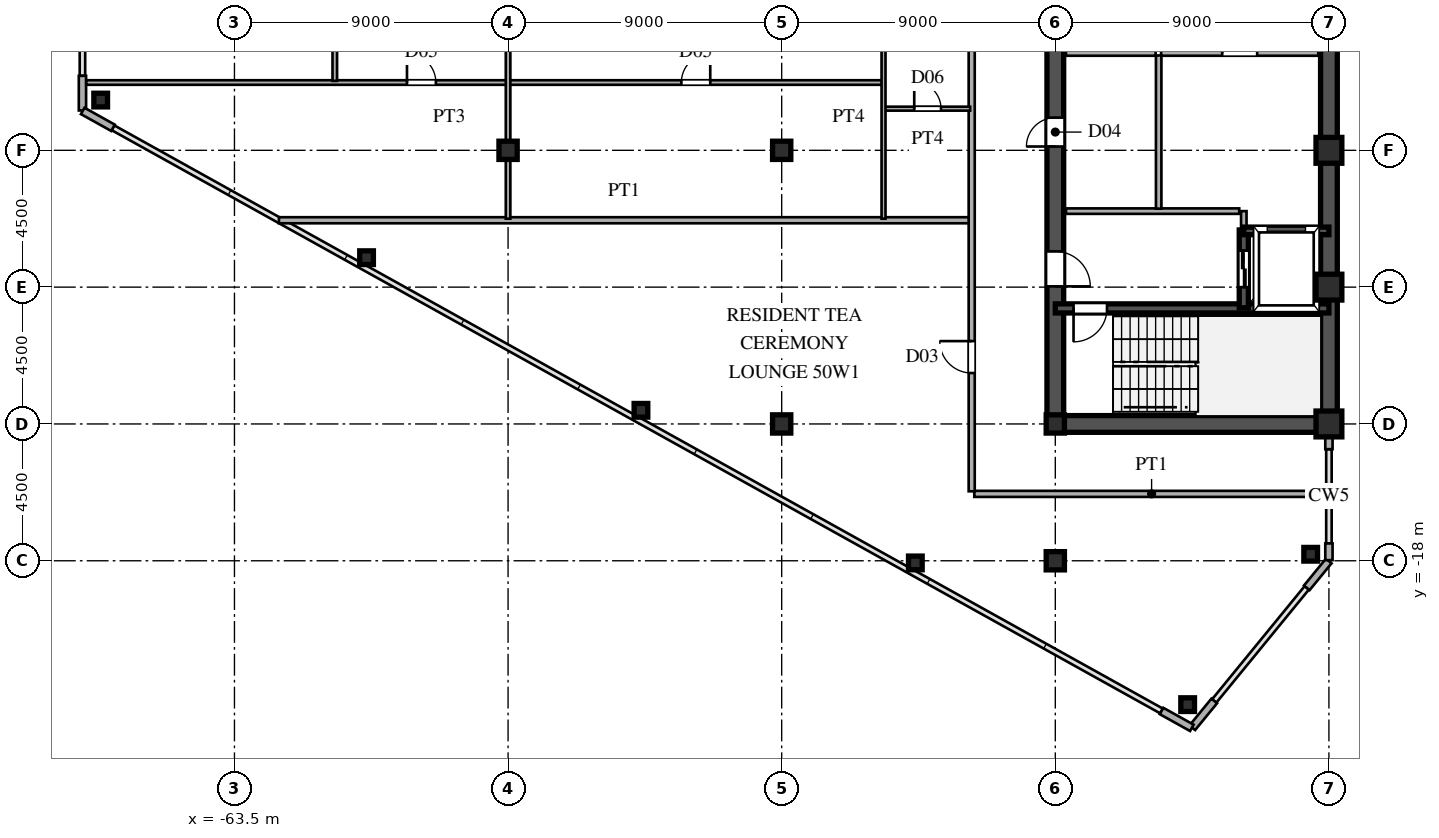
"""IFC4 building model, lengths in metres.
Left out: names, types, materials, properties, quantities, classifications, styles, units other than length and angle.
Written with IfcOpenShell. Run it as: python <this file> out.ifc"""

import sys

from ifc_helpers import new_model, si_unit, direction, frame, frame_2d, origin, origin_2d, place, context, subcontext, project, spatial, rectangle, hollow_rectangle, i_section, extrude, source, transform, mapped, element, fill, save


model = new_model("IFC4")
c1 = context("Model", 3, precision=1e-05, world=origin(), true_north=direction((0.0, 1.0)))
c2 = subcontext(c1, "Body", "Model", "MODEL_VIEW")
j1 = project(units=[si_unit("LENGTHUNIT", "METRE"), si_unit("PLANEANGLEUNIT", "RADIAN")], contexts=[c1])
p1 = place(None, origin())
s1 = spatial("IfcSite", under=j1, at=p1, CompositionType="ELEMENT")
p2 = place(p1, origin())
s2 = spatial("IfcBuilding", under=s1, at=p2, CompositionType="ELEMENT")
p3 = place(p2, frame((0.0, 0.0, 188.7)))
s3 = spatial("IfcBuildingStorey", under=s2, at=p3, CompositionType="ELEMENT", Elevation=188.7)
m1 = source(origin(), c2, "Body", "SweptSolid", [
    extrude(hollow_rectangle(XDim=0.85, YDim=0.85, WallThickness=0.036, at=origin_2d()), origin(), (0.0, 0.0, 1.0), 3.6),
])
for number, where, z_axis, x_axis in (
    (1, (-27.5, -13.5, 0.0), (0.0, 0.0, 1.0), (1.0, 0.0, 0.0)),
    (2, (-27.5, -9.0, 0.0), (0.0, 0.0, 1.0), (1.0, 0.0, 0.0)),
    (3, (-27.5, -4.5, 0.0), (0.0, 0.0, 1.0), (1.0, 0.0, 0.0)),
):
    element("IfcColumn", number, at=place(p3, frame(where, z_axis=z_axis, x_axis=x_axis)), inside=s3, PredefinedType="COLUMN", context=c2, shape_type="MappedRepresentation", body=[
        mapped(m1, transform((0.0, 0.0, 0.0), scale=1.0)),
    ])
m2 = source(origin(), c2, "Body", "SweptSolid", [
    extrude(i_section(OverallWidth=0.6, OverallDepth=0.6, WebThickness=0.025, FlangeThickness=0.04, at=origin_2d()), origin(), (0.0, 0.0, 1.0), 3.6),
])
for number, where, z_axis, x_axis in (
    (4, (-36.5, -18.0, 0.0), (0.0, 0.0, 1.0), (1.0, 0.0, 0.0)),
    (5, (-36.5, -13.5, 0.0), (0.0, 0.0, 1.0), (1.0, 0.0, 0.0)),
    (6, (-45.5, -13.5, 0.0), (0.0, 0.0, 1.0), (1.0, 0.0, 0.0)),
    (7, (-45.5, -4.5, 0.0), (0.0, 0.0, 1.0), (1.0, 0.0, 0.0)),
    (8, (-54.5, -4.5, 0.0), (0.0, 0.0, 1.0), (1.0, 0.0, 0.0)),
):
    element("IfcColumn", number, at=place(p3, frame(where, z_axis=z_axis, x_axis=x_axis)), inside=s3, PredefinedType="COLUMN", context=c2, shape_type="MappedRepresentation", body=[
        mapped(m2, transform((0.0, 0.0, 0.0), scale=1.0)),
    ])
m3 = source(origin(), c2, "Body", "SweptSolid", [
    extrude(hollow_rectangle(XDim=0.45, YDim=0.45, WallThickness=0.018, at=origin_2d()), origin(), (0.0, 0.0, 1.0), 3.6),
])
for number, where, z_axis, x_axis in (
    (9, (-28.1, -17.786, 0.0), (0.0, 0.0, 1.0), (1.0, 0.0, 0.0)),
    (10, (-67.9, -2.847, 0.0), (0.0, 0.0, 1.0), (1.0, 0.0, 0.0)),
    (11, (-32.147, -22.732, 0.0), (0.0, 0.0, 1.0), (1.0, 0.0, 0.0)),
    (12, (-41.104, -18.071, 0.0), (0.0, 0.0, 1.0), (1.0, 0.0, 0.0)),
    (13, (-50.129, -13.051, 0.0), (0.0, 0.0, 1.0), (1.0, 0.0, 0.0)),
    (14, (-59.155, -8.031, 0.0), (0.0, 0.0, 1.0), (1.0, 0.0, 0.0)),
):
    element("IfcColumn", number, at=place(p3, frame(where, z_axis=z_axis, x_axis=x_axis)), inside=s3, PredefinedType="COLUMN", context=c2, shape_type="MappedRepresentation", body=[
        mapped(m3, transform((0.0, 0.0, 0.0), scale=1.0)),
    ])
p4 = place(p3, frame((-27.5, -17.98, 0.0), z_axis=(0.0, 0.0, 1.0), x_axis=(0.0, 1.0, 0.0)))
e15 = element("IfcWall", 15, at=p4, inside=s3, PredefinedType="SOLIDWALL", context=c2, shape_type="SweptSolid", body=[
    extrude(rectangle(XDim=0.55, YDim=0.24, at=frame_2d((0.275, 0.0))), origin(), (0.0, 0.0, 1.0), 3.38),
])
p5 = place(p3, frame((-27.5, -14.33, 0.0), z_axis=(0.0, 0.0, 1.0), x_axis=(0.0, 1.0, 0.0)))
e16 = element("IfcWall", 16, at=p5, inside=s3, PredefinedType="SOLIDWALL", context=c2, shape_type="SweptSolid", body=[
    extrude(rectangle(XDim=0.55, YDim=0.24, at=frame_2d((0.275, 0.0))), origin(), (0.0, 0.0, 1.0), 2.88),
])
for number, where, z_axis, x_axis in (
    (17, (-68.5, -2.05, 0.0), (0.0, 0.0, 1.0), (0.0, -1.0, 0.0)),
    (18, (-68.491, -3.205, 0.0), (0.0, 0.0, 1.0), (0.874, -0.486, 0.0)),
    (19, (-33.005, -22.941, 0.0), (0.0, 0.0, 1.0), (0.874, -0.486, 0.0)),
):
    element("IfcWall", number, at=place(p3, frame(where, z_axis=z_axis, x_axis=x_axis)), inside=s3, PredefinedType="SOLIDWALL", context=c2, shape_type="SweptSolid", body=[
        extrude(rectangle(XDim=1.14, YDim=0.24, at=frame_2d((0.57, 0.0))), origin(), (0.0, 0.0, 1.0), 3.38),
    ])
for number, where, z_axis, x_axis in (
    (20, (-31.994, -23.492, 0.0), (0.0, 0.0, 1.0), (0.633, 0.774, 0.0)),
    (21, (-28.228, -18.89, 0.0), (0.0, 0.0, 1.0), (0.633, 0.774, 0.0)),
):
    element("IfcWall", number, at=place(p3, frame(where, z_axis=z_axis, x_axis=x_axis)), inside=s3, PredefinedType="SOLIDWALL", context=c2, shape_type="SweptSolid", body=[
        extrude(rectangle(XDim=1.14, YDim=0.24, at=frame_2d((0.57, 0.0))), origin(), (0.0, 0.0, 1.0), 3.38),
    ])
p6 = place(p3, frame((-27.5, -13.5, 0.0), z_axis=(0.0, 0.0, 1.0), x_axis=(0.0, 1.0, 0.0)))
e22 = element("IfcWall", 22, at=p6, inside=s3, PredefinedType="SHEAR", context=c2, shape_type="SweptSolid", body=[
    extrude(rectangle(XDim=12.2, YDim=0.55, at=frame_2d((6.1, 0.0))), origin(), (0.0, 0.0, 1.0), 3.38),
])
p7 = place(p3, frame((-27.5, -1.3, 0.0), z_axis=(0.0, 0.0, 1.0), x_axis=(0.0, 1.0, 0.0)))
e23 = element("IfcWall", 23, at=p7, inside=s3, PredefinedType="SHEAR", context=c2, shape_type="SweptSolid", body=[
    extrude(rectangle(XDim=2.6, YDim=0.55, at=frame_2d((1.3, 0.0))), origin(), (0.0, 0.0, 1.0), 3.38),
])
p8 = place(p3, frame((-36.5, -13.5, 0.0), z_axis=(0.0, 0.0, 1.0), x_axis=(1.0, 0.0, 0.0)))
e24 = element("IfcWall", 24, at=p8, inside=s3, PredefinedType="SHEAR", context=c2, shape_type="SweptSolid", body=[
    extrude(rectangle(XDim=9.0, YDim=0.55, at=frame_2d((4.5, 0.0))), origin(), (0.0, 0.0, 1.0), 3.38),
])
p9 = place(p3, frame((-36.5, -13.65, 0.0), z_axis=(0.0, 0.0, 1.0), x_axis=(0.0, 1.0, 0.0)))
e25 = element("IfcWall", 25, at=p9, inside=s3, PredefinedType="SHEAR", context=c2, shape_type="SweptSolid", body=[
    extrude(rectangle(XDim=7.15, YDim=0.55, at=frame_2d((3.575, 0.0))), origin(), (0.0, 0.0, 1.0), 3.38),
])
p10 = place(p9, frame((4.675, 0.0, 0.0)))
e26 = element("IfcOpeningElement", 26, at=p10, cuts=e25, PredefinedType="OPENING", context=c2, shape_type="SweptSolid", body=[
    extrude(rectangle(XDim=1.15, YDim=2.2, at=frame_2d((0.575, 1.1))), frame((0.0, 0.285, 0.0), z_axis=(0.0, -1.0, 0.0), x_axis=(1.0, 0.0, 0.0)), (0.0, 0.0, 1.0), 0.57),
])
p11 = place(p3, frame((-36.5, -1.3, 0.0), z_axis=(0.0, 0.0, 1.0), x_axis=(0.0, 1.0, 0.0)))
e27 = element("IfcWall", 27, at=p11, inside=s3, PredefinedType="SHEAR", context=c2, shape_type="SweptSolid", body=[
    extrude(rectangle(XDim=2.6, YDim=0.55, at=frame_2d((1.3, 0.0))), origin(), (0.0, 0.0, 1.0), 3.38),
])
p12 = place(p11, frame((0.55, 0.0, 0.0)))
e28 = element("IfcOpeningElement", 28, at=p12, cuts=e27, PredefinedType="OPENING", context=c2, shape_type="SweptSolid", body=[
    extrude(rectangle(XDim=1.5, YDim=2.3, at=frame_2d((0.75, 1.15))), frame((0.0, 0.285, 0.0), z_axis=(0.0, -1.0, 0.0), x_axis=(1.0, 0.0, 0.0)), (0.0, 0.0, 1.0), 0.57),
])
p13 = place(p3, frame((-36.5, -6.5, 0.0), z_axis=(0.0, 0.0, 1.0), x_axis=(0.0, 1.0, 0.0)))
e29 = element("IfcWall", 29, at=p13, inside=s3, PredefinedType="SHEAR", context=c2, shape_type="SweptSolid", body=[
    extrude(rectangle(XDim=5.2, YDim=0.55, at=frame_2d((2.6, 0.0))), origin(), (0.0, 0.0, 1.0), 3.38),
])
p14 = place(p13, frame((2.125, 0.0, 0.0)))
e30 = element("IfcOpeningElement", 30, at=p14, cuts=e29, PredefinedType="OPENING", context=c2, shape_type="SweptSolid", body=[
    extrude(rectangle(XDim=0.95, YDim=2.15, at=frame_2d((0.475, 1.075))), frame((0.0, 0.285, 0.0), z_axis=(0.0, -1.0, 0.0), x_axis=(1.0, 0.0, 0.0)), (0.0, 0.0, 1.0), 0.57),
])
p15 = place(p3, frame((-36.5, -9.7, 0.0), z_axis=(0.0, 0.0, 1.0), x_axis=(1.0, 0.0, 0.0)))
e31 = element("IfcWall", 31, at=p15, inside=s3, PredefinedType="SHEAR", context=c2, shape_type="SweptSolid", body=[
    extrude(rectangle(XDim=9.0, YDim=0.3, at=frame_2d((4.5, 0.0))), origin(), (0.0, 0.0, 1.0), 3.38),
])
p16 = place(p15, frame((0.6, 0.0, 0.0)))
e32 = element("IfcOpeningElement", 32, at=p16, cuts=e31, PredefinedType="OPENING", context=c2, shape_type="SweptSolid", body=[
    extrude(rectangle(XDim=1.1, YDim=2.2, at=frame_2d((0.55, 1.1))), frame((0.0, 0.16, 0.0), z_axis=(0.0, -1.0, 0.0), x_axis=(1.0, 0.0, 0.0)), (0.0, 0.0, 1.0), 0.32),
])
p17 = place(p3, frame((-30.3, -7.15, 0.0), z_axis=(0.0, 0.0, 1.0), x_axis=(1.0, 0.0, 0.0)))
e33 = element("IfcWall", 33, at=p17, inside=s3, PredefinedType="SHEAR", context=c2, shape_type="SweptSolid", body=[
    extrude(rectangle(XDim=2.8, YDim=0.25, at=frame_2d((1.4, 0.0))), origin(), (0.0, 0.0, 1.0), 3.38),
])
p18 = place(p3, frame((-30.3, -9.68, 0.0), z_axis=(0.0, 0.0, 1.0), x_axis=(0.0, 1.0, 0.0)))
e34 = element("IfcWall", 34, at=p18, inside=s3, PredefinedType="SHEAR", context=c2, shape_type="SweptSolid", body=[
    extrude(rectangle(XDim=2.56, YDim=0.3, at=frame_2d((1.28, 0.0))), origin(), (0.0, 0.0, 1.0), 3.38),
])
p19 = place(p18, frame((0.68, 0.0, 0.0)))
e35 = element("IfcOpeningElement", 35, at=p19, cuts=e34, PredefinedType="OPENING", context=c2, shape_type="SweptSolid", body=[
    extrude(rectangle(XDim=1.2, YDim=2.25, at=frame_2d((0.6, 1.125))), frame((0.0, 0.16, 0.0), z_axis=(0.0, -1.0, 0.0), x_axis=(1.0, 0.0, 0.0)), (0.0, 0.0, 1.0), 0.32),
])
p20 = place(p3, frame((-36.15, -6.5, 0.0), z_axis=(0.0, 0.0, 1.0), x_axis=(1.0, 0.0, 0.0)))
e36 = element("IfcWall", 36, at=p20, inside=s3, PredefinedType="PARTITIONING", context=c2, shape_type="SweptSolid", body=[
    extrude(rectangle(XDim=5.7, YDim=0.18, at=frame_2d((2.85, 0.0))), origin(), (0.0, 0.0, 1.0), 3.38),
])
p21 = place(p3, frame((-30.3, -7.12, 0.0), z_axis=(0.0, 0.0, 1.0), x_axis=(0.0, 1.0, 0.0)))
e37 = element("IfcWall", 37, at=p21, inside=s3, PredefinedType="PARTITIONING", context=c2, shape_type="SweptSolid", body=[
    extrude(rectangle(XDim=0.62, YDim=0.18, at=frame_2d((0.31, 0.0))), origin(), (0.0, 0.0, 1.0), 3.38),
])
p22 = place(p3, frame((-33.1, -6.42, 0.0), z_axis=(0.0, 0.0, 1.0), x_axis=(0.0, 1.0, 0.0)))
e38 = element("IfcWall", 38, at=p22, inside=s3, PredefinedType="PARTITIONING", context=c2, shape_type="SweptSolid", body=[
    extrude(rectangle(XDim=5.04, YDim=0.18, at=frame_2d((2.52, 0.0))), origin(), (0.0, 0.0, 1.0), 3.38),
])
p23 = place(p3, frame((-33.02, -1.3, 0.0), z_axis=(0.0, 0.0, 1.0), x_axis=(1.0, 0.0, 0.0)))
e39 = element("IfcWall", 39, at=p23, inside=s3, PredefinedType="PARTITIONING", context=c2, shape_type="SweptSolid", body=[
    extrude(rectangle(XDim=5.17, YDim=0.18, at=frame_2d((2.585, 0.0))), origin(), (0.0, 0.0, 1.0), 3.38),
])
p24 = place(p23, frame((2.01, 0.0, 0.0)))
e40 = element("IfcOpeningElement", 40, at=p24, cuts=e39, PredefinedType="OPENING", context=c2, shape_type="SweptSolid", body=[
    extrude(rectangle(XDim=1.15, YDim=2.2, at=frame_2d((0.575, 1.1))), frame((0.0, 0.1, 0.0), z_axis=(0.0, -1.0, 0.0), x_axis=(1.0, 0.0, 0.0)), (0.0, 0.0, 1.0), 0.2),
])
p25 = place(p3, frame((-36.15, -1.3, 0.0), z_axis=(0.0, 0.0, 1.0), x_axis=(1.0, 0.0, 0.0)))
e41 = element("IfcWall", 41, at=p25, inside=s3, PredefinedType="PARTITIONING", context=c2, shape_type="SweptSolid", body=[
    extrude(rectangle(XDim=2.95, YDim=0.18, at=frame_2d((1.475, 0.0))), origin(), (0.0, 0.0, 1.0), 3.38),
])
p26 = place(p3, frame((-39.165, -15.8, 0.0), z_axis=(0.0, 0.0, 1.0), x_axis=(1.0, 0.0, 0.0)))
e42 = element("IfcWall", 42, at=p26, inside=s3, PredefinedType="PARTITIONING", context=c2, shape_type="SweptSolid", body=[
    extrude(rectangle(XDim=11.665, YDim=0.2, at=frame_2d((5.833, 0.0))), origin(), (0.0, 0.0, 1.0), 3.38),
])
p27 = place(p3, frame((-62.037, -6.8, 0.0), z_axis=(0.0, 0.0, 1.0), x_axis=(1.0, 0.0, 0.0)))
e43 = element("IfcWall", 43, at=p27, inside=s3, PredefinedType="PARTITIONING", context=c2, shape_type="SweptSolid", body=[
    extrude(rectangle(XDim=22.707, YDim=0.2, at=frame_2d((11.354, 0.0))), origin(), (0.0, 0.0, 1.0), 3.38),
])
p28 = place(p3, frame((-42.1, -3.13, 0.0), z_axis=(0.0, 0.0, 1.0), x_axis=(1.0, 0.0, 0.0)))
e44 = element("IfcWall", 44, at=p28, inside=s3, PredefinedType="PARTITIONING", context=c2, shape_type="SweptSolid", body=[
    extrude(rectangle(XDim=2.8, YDim=0.13, at=frame_2d((1.4, 0.0))), origin(), (0.0, 0.0, 1.0), 3.38),
])
p29 = place(p28, frame((0.96, 0.0, 0.0)))
e45 = element("IfcOpeningElement", 45, at=p29, cuts=e44, PredefinedType="OPENING", context=c2, shape_type="SweptSolid", body=[
    extrude(rectangle(XDim=0.88, YDim=2.1, at=frame_2d((0.44, 1.05))), frame((0.0, 0.075, 0.0), z_axis=(0.0, -1.0, 0.0), x_axis=(1.0, 0.0, 0.0)), (0.0, 0.0, 1.0), 0.15),
])
p30 = place(p3, frame((-68.375, -2.27, 0.0), z_axis=(0.0, 0.0, 1.0), x_axis=(1.0, 0.0, 0.0)))
e46 = element("IfcWall", 46, at=p30, inside=s3, PredefinedType="PARTITIONING", context=c2, shape_type="SweptSolid", body=[
    extrude(rectangle(XDim=26.175, YDim=0.15, at=frame_2d((13.087, 0.0))), origin(), (0.0, 0.0, 1.0), 3.38),
])
p31 = place(p30, frame((19.575, 0.0, 0.0)))
e47 = element("IfcOpeningElement", 47, at=p31, cuts=e46, PredefinedType="OPENING", context=c2, shape_type="SweptSolid", body=[
    extrude(rectangle(XDim=0.95, YDim=2.15, at=frame_2d((0.475, 1.075))), frame((0.0, 0.085, 0.0), z_axis=(0.0, -1.0, 0.0), x_axis=(1.0, 0.0, 0.0)), (0.0, 0.0, 1.0), 0.17),
])
p32 = place(p30, frame((10.55, 0.0, 0.0)))
e48 = element("IfcOpeningElement", 48, at=p32, cuts=e46, PredefinedType="OPENING", context=c2, shape_type="SweptSolid", body=[
    extrude(rectangle(XDim=0.95, YDim=2.15, at=frame_2d((0.475, 1.075))), frame((0.0, 0.085, 0.0), z_axis=(0.0, -1.0, 0.0), x_axis=(1.0, 0.0, 0.0)), (0.0, 0.0, 1.0), 0.17),
])
p33 = place(p3, frame((-60.2, -2.217, 0.0), z_axis=(0.0, 0.0, 1.0), x_axis=(0.0, 1.0, 0.0)))
e49 = element("IfcWall", 49, at=p33, inside=s3, PredefinedType="PARTITIONING", context=c2, shape_type="SweptSolid", body=[
    extrude(rectangle(XDim=4.434, YDim=0.15, at=frame_2d((2.217, 0.0))), origin(), (0.0, 0.0, 1.0), 3.38),
])
p34 = place(p33, frame((1.742, 0.0, 0.0)))
e50 = element("IfcOpeningElement", 50, at=p34, cuts=e49, PredefinedType="OPENING", context=c2, shape_type="SweptSolid", body=[
    extrude(rectangle(XDim=0.95, YDim=2.15, at=frame_2d((0.475, 1.075))), frame((0.0, 0.085, 0.0), z_axis=(0.0, -1.0, 0.0), x_axis=(1.0, 0.0, 0.0)), (0.0, 0.0, 1.0), 0.17),
])
p35 = place(p3, frame((-54.5, -6.75, 0.0), z_axis=(0.0, 0.0, 1.0), x_axis=(0.0, 1.0, 0.0)))
e51 = element("IfcWall", 51, at=p35, inside=s3, PredefinedType="PARTITIONING", context=c2, shape_type="SweptSolid", body=[
    extrude(rectangle(XDim=13.5, YDim=0.15, at=frame_2d((6.75, 0.0))), origin(), (0.0, 0.0, 1.0), 2.78),
])
p36 = place(p35, frame((6.275, 0.0, 0.0)))
e52 = element("IfcOpeningElement", 52, at=p36, cuts=e51, PredefinedType="OPENING", context=c2, shape_type="SweptSolid", body=[
    extrude(rectangle(XDim=0.95, YDim=2.15, at=frame_2d((0.475, 1.075))), frame((0.0, 0.085, 0.0), z_axis=(0.0, -1.0, 0.0), x_axis=(1.0, 0.0, 0.0)), (0.0, 0.0, 1.0), 0.17),
])
p37 = place(p3, frame((-42.15, -6.75, 0.0), z_axis=(0.0, 0.0, 1.0), x_axis=(0.0, 1.0, 0.0)))
e53 = element("IfcWall", 53, at=p37, inside=s3, PredefinedType="PARTITIONING", context=c2, shape_type="SweptSolid", body=[
    extrude(rectangle(XDim=8.967, YDim=0.13, at=frame_2d((4.483, 0.0))), origin(), (0.0, 0.0, 1.0), 3.38),
])
p38 = place(p37, frame((6.275, 0.0, 0.0)))
e54 = element("IfcOpeningElement", 54, at=p38, cuts=e53, PredefinedType="OPENING", context=c2, shape_type="SweptSolid", body=[
    extrude(rectangle(XDim=0.95, YDim=2.15, at=frame_2d((0.475, 1.075))), frame((0.0, 0.075, 0.0), z_axis=(0.0, -1.0, 0.0), x_axis=(1.0, 0.0, 0.0)), (0.0, 0.0, 1.0), 0.15),
])
p39 = place(p3, frame((-39.25, -15.715, 0.0), z_axis=(0.0, 0.0, 1.0), x_axis=(0.0, 1.0, 0.0)))
e55 = element("IfcWall", 55, at=p39, inside=s3, PredefinedType="PARTITIONING", context=c2, shape_type="SweptSolid", body=[
    extrude(rectangle(XDim=31.43, YDim=0.2, at=frame_2d((15.715, 0.0))), origin(), (0.0, 0.0, 1.0), 3.38),
])
p40 = place(p39, frame((3.89, 0.0, 0.0)))
e56 = element("IfcOpeningElement", 56, at=p40, cuts=e55, PredefinedType="OPENING", context=c2, shape_type="SweptSolid", body=[
    extrude(rectangle(XDim=1.05, YDim=2.25, at=frame_2d((0.525, 1.125))), frame((0.0, 0.11, 0.0), z_axis=(0.0, -1.0, 0.0), x_axis=(1.0, 0.0, 0.0)), (0.0, 0.0, 1.0), 0.22),
])
p41 = place(p39, frame((14.986, 0.0, 0.0)))
e57 = element("IfcOpeningElement", 57, at=p41, cuts=e55, PredefinedType="OPENING", context=c2, shape_type="SweptSolid", body=[
    extrude(rectangle(XDim=1.05, YDim=2.25, at=frame_2d((0.525, 1.125))), frame((0.0, 0.11, 0.0), z_axis=(0.0, -1.0, 0.0), x_axis=(1.0, 0.0, 0.0)), (0.0, 0.0, 1.0), 0.22),
])
p42 = place(p39, frame((26.49, 0.0, 0.0)))
e58 = element("IfcOpeningElement", 58, at=p42, cuts=e55, PredefinedType="OPENING", context=c2, shape_type="SweptSolid", body=[
    extrude(rectangle(XDim=1.05, YDim=2.25, at=frame_2d((0.525, 1.125))), frame((0.0, 0.11, 0.0), z_axis=(0.0, -1.0, 0.0), x_axis=(1.0, 0.0, 0.0)), (0.0, 0.0, 1.0), 0.22),
])
m4 = source(origin(), c2, "Body", "SweptSolid", [
    extrude(rectangle(XDim=1.15, YDim=2.2, at=frame_2d((0.575, 1.1))), frame((0.0, 0.025, 0.0), z_axis=(0.0, -1.0, 0.0), x_axis=(1.0, 0.0, 0.0)), (0.0, 0.0, 1.0), 0.05),
])
p43 = place(p10, frame((1.15, 0.0, 0.0), z_axis=(0.0, 0.0, 1.0), x_axis=(-1.0, 0.0, 0.0)))
e59 = element("IfcDoor", 59, at=p43, inside=s3, OperationType="SINGLE_SWING_LEFT", PredefinedType="DOOR", context=c2, shape_type="MappedRepresentation", body=[
    mapped(m4, transform((0.0, 0.0, 0.0), scale=1.0)),
])
fill(e26, e59)
m5 = source(origin(), c2, "Body", "SweptSolid", [
    extrude(rectangle(XDim=0.95, YDim=2.15, at=frame_2d((0.475, 1.075))), frame((0.0, 0.025, 0.0), z_axis=(0.0, -1.0, 0.0), x_axis=(1.0, 0.0, 0.0)), (0.0, 0.0, 1.0), 0.05),
])
p44 = place(p14, origin())
e60 = element("IfcDoor", 60, at=p44, inside=s3, OperationType="SINGLE_SWING_LEFT", PredefinedType="DOOR", context=c2, shape_type="MappedRepresentation", body=[
    mapped(m5, transform((0.0, 0.0, 0.0), scale=1.0)),
])
fill(e30, e60)
m6 = source(origin(), c2, "Body", "SweptSolid", [
    extrude(rectangle(XDim=1.1, YDim=2.2, at=frame_2d((0.55, 1.1))), frame((0.0, 0.025, 0.0), z_axis=(0.0, -1.0, 0.0), x_axis=(1.0, 0.0, 0.0)), (0.0, 0.0, 1.0), 0.05),
])
p45 = place(p16, frame((1.1, 0.0, 0.0), z_axis=(0.0, 0.0, 1.0), x_axis=(-1.0, 0.0, 0.0)))
e61 = element("IfcDoor", 61, at=p45, inside=s3, OperationType="SINGLE_SWING_LEFT", PredefinedType="DOOR", context=c2, shape_type="MappedRepresentation", body=[
    mapped(m6, transform((0.0, 0.0, 0.0), scale=1.0)),
])
fill(e32, e61)
m7 = source(origin(), c2, "Body", "SweptSolid", [
    extrude(rectangle(XDim=1.2, YDim=2.25, at=frame_2d((0.6, 1.125))), frame((0.0, 0.025, 0.0), z_axis=(0.0, -1.0, 0.0), x_axis=(1.0, 0.0, 0.0)), (0.0, 0.0, 1.0), 0.05),
])
p46 = place(p19, origin())
e62 = element("IfcDoor", 62, at=p46, inside=s3, OperationType="DOUBLE_DOOR_SLIDING", PredefinedType="DOOR", context=c2, shape_type="MappedRepresentation", body=[
    mapped(m7, transform((0.0, 0.0, 0.0), scale=1.0)),
])
fill(e35, e62)
p47 = place(p24, origin())
e63 = element("IfcDoor", 63, at=p47, inside=s3, OperationType="SINGLE_SWING_LEFT", PredefinedType="DOOR", context=c2, shape_type="MappedRepresentation", body=[
    mapped(m4, transform((0.0, 0.0, 0.0), scale=1.0)),
])
fill(e40, e63)
m8 = source(origin(), c2, "Body", "SweptSolid", [
    extrude(rectangle(XDim=0.88, YDim=2.1, at=frame_2d((0.44, 1.05))), frame((0.0, 0.025, 0.0), z_axis=(0.0, -1.0, 0.0), x_axis=(1.0, 0.0, 0.0)), (0.0, 0.0, 1.0), 0.05),
])
p48 = place(p29, origin())
e64 = element("IfcDoor", 64, at=p48, inside=s3, OperationType="SINGLE_SWING_LEFT", PredefinedType="DOOR", context=c2, shape_type="MappedRepresentation", body=[
    mapped(m8, transform((0.0, 0.0, 0.0), scale=1.0)),
])
fill(e45, e64)
m9 = source(origin(), c2, "Body", "SweptSolid", [
    extrude(rectangle(XDim=0.95, YDim=2.15, at=frame_2d((0.475, 1.075))), frame((0.0, 0.025, 0.0), z_axis=(0.0, -1.0, 0.0), x_axis=(1.0, 0.0, 0.0)), (0.0, 0.0, 1.0), 0.05),
])
p49 = place(p31, origin())
e65 = element("IfcDoor", 65, at=p49, inside=s3, OperationType="SINGLE_SWING_RIGHT", PredefinedType="DOOR", context=c2, shape_type="MappedRepresentation", body=[
    mapped(m9, transform((0.0, 0.0, 0.0), scale=1.0)),
])
fill(e47, e65)
p50 = place(p32, origin())
e66 = element("IfcDoor", 66, at=p50, inside=s3, OperationType="SINGLE_SWING_LEFT", PredefinedType="DOOR", context=c2, shape_type="MappedRepresentation", body=[
    mapped(m9, transform((0.0, 0.0, 0.0), scale=1.0)),
])
fill(e48, e66)
m10 = source(origin(), c2, "Body", "SweptSolid", [
    extrude(rectangle(XDim=1.05, YDim=2.25, at=frame_2d((0.525, 1.125))), frame((0.0, 0.025, 0.0), z_axis=(0.0, -1.0, 0.0), x_axis=(1.0, 0.0, 0.0)), (0.0, 0.0, 1.0), 0.05),
])
p51 = place(p40, origin())
e67 = element("IfcDoor", 67, at=p51, inside=s3, OperationType="SINGLE_SWING_RIGHT", PredefinedType="DOOR", context=c2, shape_type="MappedRepresentation", body=[
    mapped(m10, transform((0.0, 0.0, 0.0), scale=1.0)),
])
fill(e56, e67)
save(model, sys.argv[1])
